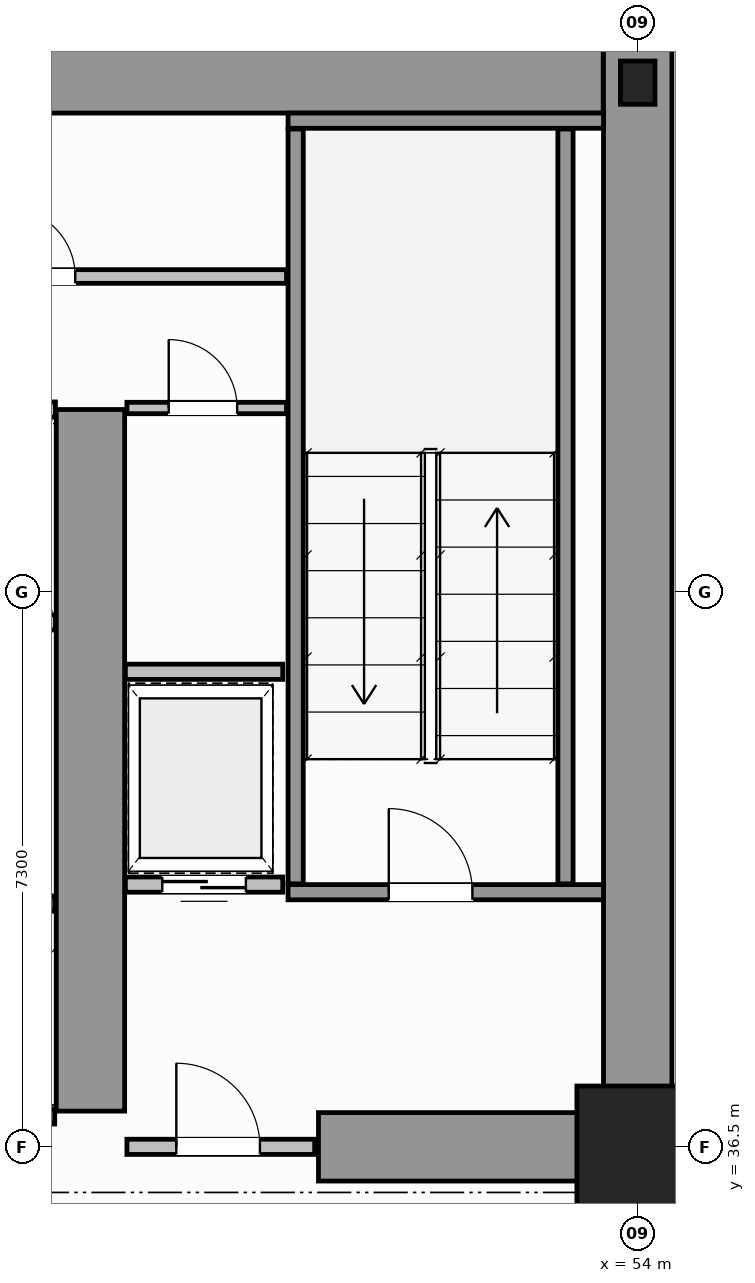
"""IFC4 building model, lengths in metres.
Left out: names, types, materials, properties, quantities, classifications, styles, units other than length and angle.
Written with IfcOpenShell. Run it as: python <this file> out.ifc"""

import sys

from ifc_helpers import new_model, si_unit, direction, frame, frame_2d, origin, origin_2d, place, context, subcontext, project, spatial, rectangle, i_section, extrude, source, transform, mapped, element, fill, save


model = new_model("IFC4")
c1 = context("Model", 3, precision=1e-05, world=origin(), true_north=direction((0.0, 1.0)))
c2 = subcontext(c1, "Body", "Model", "MODEL_VIEW")
j1 = project(units=[si_unit("LENGTHUNIT", "METRE"), si_unit("PLANEANGLEUNIT", "RADIAN")], contexts=[c1])
p1 = place(None, origin())
s1 = spatial("IfcSite", under=j1, at=p1, CompositionType="ELEMENT")
p2 = place(p1, origin())
s2 = spatial("IfcBuilding", under=s1, at=p2, CompositionType="ELEMENT")
p3 = place(p2, frame((0.0, 0.0, 14.4)))
s3 = spatial("IfcBuildingStorey", under=s2, at=p3, CompositionType="ELEMENT", Elevation=14.4)
m1 = source(origin(), c2, "Body", "SweptSolid", [
    extrude(rectangle(XDim=1.6, YDim=1.6, at=origin_2d()), origin(), (0.0, 0.0, 1.0), 4.4),
])
p4 = place(p3, frame((54.0, 36.5, 0.0), z_axis=(0.0, 0.0, 1.0), x_axis=(1.0, 0.0, 0.0)))
e1 = element("IfcColumn", 1, at=p4, inside=s3, PredefinedType="COLUMN", context=c2, shape_type="MappedRepresentation", body=[
    mapped(m1, transform((0.0, 0.0, 0.0), scale=1.0)),
])
m2 = source(origin(), c2, "Body", "SweptSolid", [
    extrude(i_section(OverallWidth=0.454, OverallDepth=0.569, WebThickness=0.078, FlangeThickness=0.08, FilletRadius=0.015, at=origin_2d()), origin(), (0.0, 0.0, 1.0), 4.4),
])
p5 = place(p3, frame((54.0, 50.5, 0.0), z_axis=(0.0, 0.0, 1.0), x_axis=(1.0, 0.0, 0.0)))
e2 = element("IfcColumn", 2, at=p5, inside=s3, PredefinedType="COLUMN", context=c2, shape_type="MappedRepresentation", body=[
    mapped(m2, transform((0.0, 0.0, 0.0), scale=1.0)),
])
p6 = place(p3, frame((34.002, 50.55, 0.0), z_axis=(0.0, 0.0, 1.0), x_axis=(1.0, 0.0, 0.0)))
e3 = element("IfcWall", 3, at=p6, inside=s3, PredefinedType="SHEAR", context=c2, shape_type="SweptSolid", body=[
    extrude(rectangle(XDim=19.544, YDim=0.9, at=frame_2d((9.772, 0.0))), origin(), (0.0, 0.0, 1.0), 4.4),
])
p7 = place(p3, frame((54.0, 36.5, 0.0), z_axis=(0.0, 0.0, 1.0), x_axis=(0.0, 1.0, 0.0)))
e4 = element("IfcWall", 4, at=p7, inside=s3, PredefinedType="SHEAR", context=c2, shape_type="SweptSolid", body=[
    extrude(rectangle(XDim=14.5, YDim=0.9, at=frame_2d((7.25, 0.0))), origin(), (0.0, 0.0, 1.0), 4.4),
])
p8 = place(p3, frame((49.8, 36.5, 0.0), z_axis=(0.0, 0.0, 1.0), x_axis=(1.0, 0.0, 0.0)))
e5 = element("IfcWall", 5, at=p8, inside=s3, PredefinedType="SHEAR", context=c2, shape_type="SweptSolid", body=[
    extrude(rectangle(XDim=3.73, YDim=0.9, at=frame_2d((1.865, 0.0))), origin(), (0.0, 0.0, 1.0), 2.92),
])
p9 = place(p3, frame((46.8, 36.97, 0.0), z_axis=(0.0, 0.0, 1.0), x_axis=(0.0, 1.0, 0.0)))
e6 = element("IfcWall", 6, at=p9, inside=s3, PredefinedType="SHEAR", context=c2, shape_type="SweptSolid", body=[
    extrude(rectangle(XDim=9.23, YDim=0.9, at=frame_2d((4.615, 0.0))), origin(), (0.0, 0.0, 1.0), 4.4),
])
p10 = place(p3, frame((49.4, 39.85, 0.0), z_axis=(0.0, 0.0, 1.0), x_axis=(1.0, 0.0, 0.0)))
e7 = element("IfcWall", 7, at=p10, inside=s3, PredefinedType="SOLIDWALL", context=c2, shape_type="SweptSolid", body=[
    extrude(rectangle(XDim=4.15, YDim=0.2, at=frame_2d((2.075, 0.0))), origin(), (0.0, 0.0, 1.0), 4.4),
])
p11 = place(p10, frame((1.325, 0.0, 0.0)))
e8 = element("IfcOpeningElement", 8, at=p11, cuts=e7, PredefinedType="OPENING", context=c2, shape_type="SweptSolid", body=[
    extrude(rectangle(XDim=1.1, YDim=2.15, at=frame_2d((0.55, 1.075))), frame((0.0, 0.11, 0.0), z_axis=(0.0, -1.0, 0.0), x_axis=(1.0, 0.0, 0.0)), (0.0, 0.0, 1.0), 0.22),
])
p12 = place(p3, frame((49.4, 50.0, 0.0), z_axis=(0.0, 0.0, 1.0), x_axis=(1.0, 0.0, 0.0)))
e9 = element("IfcWall", 9, at=p12, inside=s3, PredefinedType="SOLIDWALL", context=c2, shape_type="SweptSolid", body=[
    extrude(rectangle(XDim=4.15, YDim=0.2, at=frame_2d((2.075, 0.0))), origin(), (0.0, 0.0, 1.0), 4.4),
])
for number, where, z_axis, x_axis in (
    (10, (49.5, 39.96, 0.0), (0.0, 0.0, 1.0), (0.0, 1.0, 0.0)),
    (11, (53.05, 39.96, 0.0), (0.0, 0.0, 1.0), (0.0, 1.0, 0.0)),
):
    element("IfcWall", number, at=place(p3, frame(where, z_axis=z_axis, x_axis=x_axis)), inside=s3, PredefinedType="SOLIDWALL", context=c2, shape_type="SweptSolid", body=[
        extrude(rectangle(XDim=9.93, YDim=0.2, at=frame_2d((4.965, 0.0))), origin(), (0.0, 0.0, 1.0), 4.4),
    ])
p13 = place(p3, frame((47.28, 36.5, 0.0), z_axis=(0.0, 0.0, 1.0), x_axis=(1.0, 0.0, 0.0)))
e12 = element("IfcWall", 12, at=p13, inside=s3, PredefinedType="SOLIDWALL", context=c2, shape_type="SweptSolid", body=[
    extrude(rectangle(XDim=2.47, YDim=0.2, at=frame_2d((1.235, 0.0))), origin(), (0.0, 0.0, 1.0), 2.91),
])
p14 = place(p13, frame((0.65, 0.0, 0.0)))
e13 = element("IfcOpeningElement", 13, at=p14, cuts=e12, PredefinedType="OPENING", context=c2, shape_type="SweptSolid", body=[
    extrude(rectangle(XDim=1.1, YDim=2.15, at=frame_2d((0.55, 1.075))), frame((0.0, 0.11, 0.0), z_axis=(0.0, -1.0, 0.0), x_axis=(1.0, 0.0, 0.0)), (0.0, 0.0, 1.0), 0.22),
])
p15 = place(p3, frame((44.37, 39.7, 0.0), z_axis=(0.0, 0.0, 1.0), x_axis=(1.0, 0.0, 0.0)))
e14 = element("IfcWall", 14, at=p15, inside=s3, PredefinedType="SOLIDWALL", context=c2, shape_type="SweptSolid", body=[
    extrude(rectangle(XDim=1.96, YDim=0.2, at=frame_2d((0.98, 0.0))), origin(), (0.0, 0.0, 1.0), 4.12),
])
p16 = place(p3, frame((44.37, 36.9, 0.0), z_axis=(0.0, 0.0, 1.0), x_axis=(1.0, 0.0, 0.0)))
e15 = element("IfcWall", 15, at=p16, inside=s3, PredefinedType="SOLIDWALL", context=c2, shape_type="SweptSolid", body=[
    extrude(rectangle(XDim=1.96, YDim=0.2, at=frame_2d((0.98, 0.0))), origin(), (0.0, 0.0, 1.0), 2.91),
])
for number, where, z_axis, x_axis in (
    (16, (44.62, 43.4, 0.0), (0.0, 0.0, 1.0), (1.0, 0.0, 0.0)),
    (17, (44.62, 46.2, 0.0), (0.0, 0.0, 1.0), (1.0, 0.0, 0.0)),
):
    element("IfcWall", number, at=place(p3, frame(where, z_axis=z_axis, x_axis=x_axis)), inside=s3, PredefinedType="SOLIDWALL", context=c2, shape_type="SweptSolid", body=[
        extrude(rectangle(XDim=1.72, YDim=0.2, at=frame_2d((0.86, 0.0))), origin(), (0.0, 0.0, 1.0), 4.12),
    ])
p17 = place(p3, frame((47.26, 39.95, 0.0), z_axis=(0.0, 0.0, 1.0), x_axis=(1.0, 0.0, 0.0)))
e18 = element("IfcWall", 18, at=p17, inside=s3, PredefinedType="SOLIDWALL", context=c2, shape_type="SweptSolid", body=[
    extrude(rectangle(XDim=2.07, YDim=0.2, at=frame_2d((1.035, 0.0))), origin(), (0.0, 0.0, 1.0), 4.12),
])
p18 = place(p17, frame((0.485, 0.0, 0.0)))
e19 = element("IfcOpeningElement", 19, at=p18, cuts=e18, PredefinedType="OPENING", context=c2, shape_type="SweptSolid", body=[
    extrude(rectangle(XDim=1.1, YDim=2.15, at=frame_2d((0.55, 1.075))), frame((0.0, 0.11, 0.0), z_axis=(0.0, -1.0, 0.0), x_axis=(1.0, 0.0, 0.0)), (0.0, 0.0, 1.0), 0.22),
])
p19 = place(p3, frame((47.26, 42.75, 0.0), z_axis=(0.0, 0.0, 1.0), x_axis=(1.0, 0.0, 0.0)))
e20 = element("IfcWall", 20, at=p19, inside=s3, PredefinedType="SOLIDWALL", context=c2, shape_type="SweptSolid", body=[
    extrude(rectangle(XDim=2.07, YDim=0.2, at=frame_2d((1.035, 0.0))), origin(), (0.0, 0.0, 1.0), 4.12),
])
p20 = place(p3, frame((47.28, 46.22, 0.0), z_axis=(0.0, 0.0, 1.0), x_axis=(1.0, 0.0, 0.0)))
e21 = element("IfcWall", 21, at=p20, inside=s3, PredefinedType="PARTITIONING", context=c2, shape_type="SweptSolid", body=[
    extrude(rectangle(XDim=2.1, YDim=0.15, at=frame_2d((1.05, 0.0))), origin(), (0.0, 0.0, 1.0), 4.12),
])
p21 = place(p20, frame((0.55, 0.0, 0.0)))
e22 = element("IfcOpeningElement", 22, at=p21, cuts=e21, PredefinedType="OPENING", context=c2, shape_type="SweptSolid", body=[
    extrude(rectangle(XDim=0.9, YDim=2.1, at=frame_2d((0.45, 1.05))), frame((0.0, 0.085, 0.0), z_axis=(0.0, -1.0, 0.0), x_axis=(1.0, 0.0, 0.0)), (0.0, 0.0, 1.0), 0.17),
])
p22 = place(p3, frame((43.3, 47.95, 0.0), z_axis=(0.0, 0.0, 1.0), x_axis=(1.0, 0.0, 0.0)))
e23 = element("IfcWall", 23, at=p22, inside=s3, PredefinedType="PLUMBINGWALL", context=c2, shape_type="SweptSolid", body=[
    extrude(rectangle(XDim=6.08, YDim=0.18, at=frame_2d((3.04, 0.0))), origin(), (0.0, 0.0, 1.0), 4.12),
])
p23 = place(p22, frame((2.4, 0.0, 0.0)))
e24 = element("IfcOpeningElement", 24, at=p23, cuts=e23, PredefinedType="OPENING", context=c2, shape_type="SweptSolid", body=[
    extrude(rectangle(XDim=0.9, YDim=2.15, at=frame_2d((0.45, 1.075))), frame((0.0, 0.1, 0.0), z_axis=(0.0, -1.0, 0.0), x_axis=(1.0, 0.0, 0.0)), (0.0, 0.0, 1.0), 0.2),
])
m3 = source(origin(), c2, "Body", "SweptSolid", [
    extrude(rectangle(XDim=1.1, YDim=2.15, at=frame_2d((0.55, 1.075))), frame((0.0, 0.025, 0.0), z_axis=(0.0, -1.0, 0.0), x_axis=(1.0, 0.0, 0.0)), (0.0, 0.0, 1.0), 0.05),
])
p24 = place(p11, origin())
e25 = element("IfcDoor", 25, at=p24, inside=s3, OperationType="SINGLE_SWING_RIGHT", PredefinedType="DOOR", context=c2, shape_type="MappedRepresentation", body=[
    mapped(m3, transform((0.0, 0.0, 0.0), scale=1.0)),
])
fill(e8, e25)
p25 = place(p14, origin())
e26 = element("IfcDoor", 26, at=p25, inside=s3, OperationType="SINGLE_SWING_LEFT", PredefinedType="DOOR", context=c2, shape_type="MappedRepresentation", body=[
    mapped(m3, transform((0.0, 0.0, 0.0), scale=1.0)),
])
fill(e13, e26)
p26 = place(p18, origin())
e27 = element("IfcDoor", 27, at=p26, inside=s3, OperationType="DOUBLE_DOOR_SLIDING", PredefinedType="DOOR", context=c2, shape_type="MappedRepresentation", body=[
    mapped(m3, transform((0.0, 0.0, 0.0), scale=1.0)),
])
fill(e19, e27)
m4 = source(origin(), c2, "Body", "SweptSolid", [
    extrude(rectangle(XDim=0.9, YDim=2.1, at=frame_2d((0.45, 1.05))), frame((0.0, 0.025, 0.0), z_axis=(0.0, -1.0, 0.0), x_axis=(1.0, 0.0, 0.0)), (0.0, 0.0, 1.0), 0.05),
])
p27 = place(p21, origin())
e28 = element("IfcDoor", 28, at=p27, inside=s3, OperationType="SINGLE_SWING_RIGHT", PredefinedType="DOOR", context=c2, shape_type="MappedRepresentation", body=[
    mapped(m4, transform((0.0, 0.0, 0.0), scale=1.0)),
])
fill(e22, e28)
m5 = source(origin(), c2, "Body", "SweptSolid", [
    extrude(rectangle(XDim=0.9, YDim=2.15, at=frame_2d((0.45, 1.075))), frame((0.0, 0.025, 0.0), z_axis=(0.0, -1.0, 0.0), x_axis=(1.0, 0.0, 0.0)), (0.0, 0.0, 1.0), 0.05),
])
p28 = place(p23, origin())
e29 = element("IfcDoor", 29, at=p28, inside=s3, OperationType="SINGLE_SWING_RIGHT", PredefinedType="DOOR", context=c2, shape_type="MappedRepresentation", body=[
    mapped(m5, transform((0.0, 0.0, 0.0), scale=1.0)),
])
fill(e24, e29)
save(model, sys.argv[1])
